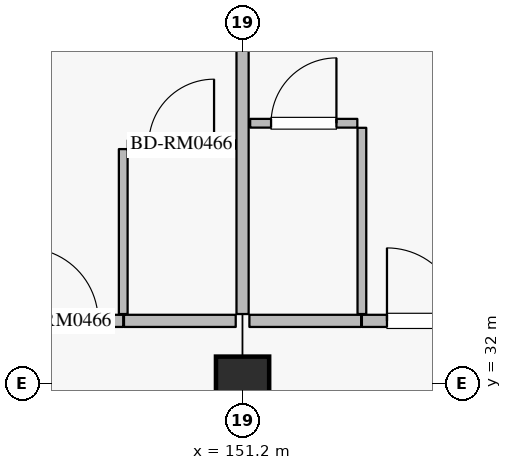
"""IFC4 building model, lengths in metres.
Left out: names, types, materials, properties, quantities, classifications, styles, units other than length and angle.
Written with IfcOpenShell. Run it as: python <this file> out.ifc"""

import sys

from ifc_helpers import new_model, si_unit, direction, frame, frame_2d, origin, origin_2d, place, context, subcontext, project, spatial, rectangle, extrude, element, fill, save


model = new_model("IFC4")
c1 = context("Model", 3, precision=1e-05, world=origin(), true_north=direction((0.0, 1.0)))
c2 = subcontext(c1, "Body", "Model", "MODEL_VIEW")
j1 = project(units=[si_unit("LENGTHUNIT", "METRE"), si_unit("PLANEANGLEUNIT", "RADIAN")], contexts=[c1])
p1 = place(None, origin())
s1 = spatial("IfcSite", under=j1, at=p1, CompositionType="ELEMENT")
p2 = place(p1, origin())
s2 = spatial("IfcBuilding", under=s1, at=p2, CompositionType="ELEMENT")
p3 = place(p2, frame((0.0, 0.0, 16.2)))
s3 = spatial("IfcBuildingStorey", under=s2, at=p3, CompositionType="ELEMENT", Elevation=16.2)
p4 = place(p3, frame((151.2, 32.0, 0.0), z_axis=(0.0, 0.0, 1.0), x_axis=(1.0, 0.0, 0.0)))
e1 = element("IfcColumn", 1, at=p4, inside=s3, PredefinedType="COLUMN", context=c2, shape_type="SweptSolid", body=[
    extrude(rectangle(XDim=0.7, YDim=0.7, at=origin_2d()), origin(), (0.0, 0.0, 1.0), 4.8),
])
p5 = place(p3, frame((143.2, 32.381, 0.0), z_axis=(0.0, 0.0, 1.0), x_axis=(0.724156739794, 0.689635422677, 0.0)))
e2 = element("IfcWall", 2, at=p5, inside=s3, PredefinedType="SOLIDWALL", context=c2, shape_type="SweptSolid", body=[
    extrude(rectangle(XDim=10.495, YDim=0.24, at=frame_2d((5.248, 0.0))), origin(), (0.0, 0.0, 1.0), 4.13),
])
p6 = place(p5, frame((0.125, 0.0, 0.8)))
e3 = element("IfcOpeningElement", 3, at=p6, cuts=e2, PredefinedType="OPENING", context=c2, shape_type="SweptSolid", body=[
    extrude(rectangle(XDim=1.6, YDim=1.6, at=frame_2d((0.8, 0.8))), frame((0.0, 0.13, 0.0), z_axis=(0.0, -1.0, 0.0), x_axis=(1.0, 0.0, 0.0)), (0.0, 0.0, 1.0), 0.26),
])
p7 = place(p5, frame((3.453, 0.0, 0.8)))
e4 = element("IfcOpeningElement", 4, at=p7, cuts=e2, PredefinedType="OPENING", context=c2, shape_type="SweptSolid", body=[
    extrude(rectangle(XDim=1.6, YDim=1.6, at=frame_2d((0.8, 0.8))), frame((0.0, 0.13, 0.0), z_axis=(0.0, -1.0, 0.0), x_axis=(1.0, 0.0, 0.0)), (0.0, 0.0, 1.0), 0.26),
])
p8 = place(p5, frame((7.776, 0.0, 0.8)))
e5 = element("IfcOpeningElement", 5, at=p8, cuts=e2, PredefinedType="OPENING", context=c2, shape_type="SweptSolid", body=[
    extrude(rectangle(XDim=1.6, YDim=1.6, at=frame_2d((0.8, 0.8))), frame((0.0, 0.13, 0.0), z_axis=(0.0, -1.0, 0.0), x_axis=(1.0, 0.0, 0.0)), (0.0, 0.0, 1.0), 0.26),
])
p9 = place(p3, frame((148.01, 32.82, 0.0), z_axis=(0.0, 0.0, 1.0), x_axis=(1.0, 0.0, 0.0)))
e6 = element("IfcWall", 6, at=p9, inside=s3, PredefinedType="PARTITIONING", context=c2, shape_type="SweptSolid", body=[
    extrude(rectangle(XDim=1.62, YDim=0.16, at=frame_2d((0.81, 0.0))), origin(), (0.0, 0.0, 1.0), 4.535),
])
p10 = place(p9, frame((0.33, 0.0, 0.0)))
e7 = element("IfcOpeningElement", 7, at=p10, cuts=e6, PredefinedType="OPENING", context=c2, shape_type="SweptSolid", body=[
    extrude(rectangle(XDim=0.96, YDim=2.2, at=frame_2d((0.48, 1.1))), frame((0.0, 0.09, 0.0), z_axis=(0.0, -1.0, 0.0), x_axis=(1.0, 0.0, 0.0)), (0.0, 0.0, 1.0), 0.18),
])
p11 = place(p3, frame((149.64, 32.82, 0.0), z_axis=(0.0, 0.0, 1.0), x_axis=(1.0, 0.0, 0.0)))
e8 = element("IfcWall", 8, at=p11, inside=s3, PredefinedType="PARTITIONING", context=c2, shape_type="SweptSolid", body=[
    extrude(rectangle(XDim=1.47, YDim=0.16, at=frame_2d((0.735, 0.0))), origin(), (0.0, 0.0, 1.0), 4.535),
])
p12 = place(p3, frame((149.63, 32.91, 0.0), z_axis=(0.0, 0.0, 1.0), x_axis=(0.0, 1.0, 0.0)))
e9 = element("IfcWall", 9, at=p12, inside=s3, PredefinedType="PARTITIONING", context=c2, shape_type="SweptSolid", body=[
    extrude(rectangle(XDim=2.17, YDim=0.115, at=frame_2d((1.085, 0.0))), origin(), (0.0, 0.0, 1.0), 4.535),
])
p13 = place(p3, frame((149.69, 35.14, 0.0), z_axis=(0.0, 0.0, 1.0), x_axis=(1.0, 0.0, 0.0)))
e10 = element("IfcWall", 10, at=p13, inside=s3, PredefinedType="PARTITIONING", context=c2, shape_type="SweptSolid", body=[
    extrude(rectangle(XDim=1.41, YDim=0.115, at=frame_2d((0.705, 0.0))), origin(), (0.0, 0.0, 1.0), 4.535),
])
p14 = place(p13, frame((0.275, 0.0, 0.0)))
e11 = element("IfcOpeningElement", 11, at=p14, cuts=e10, PredefinedType="OPENING", context=c2, shape_type="SweptSolid", body=[
    extrude(rectangle(XDim=0.86, YDim=2.12, at=frame_2d((0.43, 1.06))), frame((0.0, 0.067, 0.0), z_axis=(0.0, -1.0, 0.0), x_axis=(1.0, 0.0, 0.0)), (0.0, 0.0, 1.0), 0.135),
])
p15 = place(p3, frame((151.29, 32.82, 0.0), z_axis=(0.0, 0.0, 1.0), x_axis=(1.0, 0.0, 0.0)))
e12 = element("IfcWall", 12, at=p15, inside=s3, PredefinedType="PARTITIONING", context=c2, shape_type="SweptSolid", body=[
    extrude(rectangle(XDim=1.47, YDim=0.16, at=frame_2d((0.735, 0.0))), origin(), (0.0, 0.0, 1.0), 4.535),
])
p16 = place(p3, frame((152.77, 32.82, 0.0), z_axis=(0.0, 0.0, 1.0), x_axis=(1.0, 0.0, 0.0)))
e13 = element("IfcWall", 13, at=p16, inside=s3, PredefinedType="PARTITIONING", context=c2, shape_type="SweptSolid", body=[
    extrude(rectangle(XDim=1.62, YDim=0.16, at=frame_2d((0.81, 0.0))), origin(), (0.0, 0.0, 1.0), 4.535),
])
p17 = place(p16, frame((0.33, 0.0, 0.0)))
e14 = element("IfcOpeningElement", 14, at=p17, cuts=e13, PredefinedType="OPENING", context=c2, shape_type="SweptSolid", body=[
    extrude(rectangle(XDim=0.96, YDim=2.2, at=frame_2d((0.48, 1.1))), frame((0.0, 0.09, 0.0), z_axis=(0.0, -1.0, 0.0), x_axis=(1.0, 0.0, 0.0)), (0.0, 0.0, 1.0), 0.18),
])
p18 = place(p3, frame((152.77, 32.91, 0.0), z_axis=(0.0, 0.0, 1.0), x_axis=(0.0, 1.0, 0.0)))
e15 = element("IfcWall", 15, at=p18, inside=s3, PredefinedType="PARTITIONING", context=c2, shape_type="SweptSolid", body=[
    extrude(rectangle(XDim=2.45, YDim=0.115, at=frame_2d((1.225, 0.0))), origin(), (0.0, 0.0, 1.0), 4.535),
])
p19 = place(p3, frame((151.3, 35.42, 0.0), z_axis=(0.0, 0.0, 1.0), x_axis=(1.0, 0.0, 0.0)))
e16 = element("IfcWall", 16, at=p19, inside=s3, PredefinedType="PARTITIONING", context=c2, shape_type="SweptSolid", body=[
    extrude(rectangle(XDim=1.41, YDim=0.115, at=frame_2d((0.705, 0.0))), origin(), (0.0, 0.0, 1.0), 4.535),
])
p20 = place(p19, frame((0.275, 0.0, 0.0)))
e17 = element("IfcOpeningElement", 17, at=p20, cuts=e16, PredefinedType="OPENING", context=c2, shape_type="SweptSolid", body=[
    extrude(rectangle(XDim=0.86, YDim=2.12, at=frame_2d((0.43, 1.06))), frame((0.0, 0.067, 0.0), z_axis=(0.0, -1.0, 0.0), x_axis=(1.0, 0.0, 0.0)), (0.0, 0.0, 1.0), 0.135),
])
p21 = place(p3, frame((151.2, 32.91, 0.0), z_axis=(0.0, 0.0, 1.0), x_axis=(0.0, 1.0, 0.0)))
e18 = element("IfcWall", 18, at=p21, inside=s3, PredefinedType="PARTITIONING", context=c2, shape_type="SweptSolid", body=[
    extrude(rectangle(XDim=6.75, YDim=0.16, at=frame_2d((3.375, 0.0))), origin(), (0.0, 0.0, 1.0), 3.98),
])
p22 = place(p10, origin())
e19 = element("IfcDoor", 19, at=p22, inside=s3, OperationType="SINGLE_SWING_LEFT", PredefinedType="DOOR", context=c2, shape_type="SweptSolid", body=[
    extrude(rectangle(XDim=0.96, YDim=2.2, at=frame_2d((0.48, 1.1))), frame((0.0, 0.025, 0.0), z_axis=(0.0, -1.0, 0.0), x_axis=(1.0, 0.0, 0.0)), (0.0, 0.0, 1.0), 0.05),
])
fill(e7, e19)
p23 = place(p14, origin())
e20 = element("IfcDoor", 20, at=p23, inside=s3, OperationType="SINGLE_SWING_RIGHT", PredefinedType="DOOR", context=c2, shape_type="SweptSolid", body=[
    extrude(rectangle(XDim=0.86, YDim=2.12, at=frame_2d((0.43, 1.06))), frame((0.0, 0.025, 0.0), z_axis=(0.0, -1.0, 0.0), x_axis=(1.0, 0.0, 0.0)), (0.0, 0.0, 1.0), 0.05),
])
fill(e11, e20)
p24 = place(p17, origin())
e21 = element("IfcDoor", 21, at=p24, inside=s3, OperationType="SINGLE_SWING_LEFT", PredefinedType="DOOR", context=c2, shape_type="SweptSolid", body=[
    extrude(rectangle(XDim=0.96, YDim=2.2, at=frame_2d((0.48, 1.1))), frame((0.0, 0.025, 0.0), z_axis=(0.0, -1.0, 0.0), x_axis=(1.0, 0.0, 0.0)), (0.0, 0.0, 1.0), 0.05),
])
fill(e14, e21)
p25 = place(p20, origin())
e22 = element("IfcDoor", 22, at=p25, inside=s3, OperationType="SINGLE_SWING_RIGHT", PredefinedType="DOOR", context=c2, shape_type="SweptSolid", body=[
    extrude(rectangle(XDim=0.86, YDim=2.12, at=frame_2d((0.43, 1.06))), frame((0.0, 0.025, 0.0), z_axis=(0.0, -1.0, 0.0), x_axis=(1.0, 0.0, 0.0)), (0.0, 0.0, 1.0), 0.05),
])
fill(e17, e22)
save(model, sys.argv[1])
